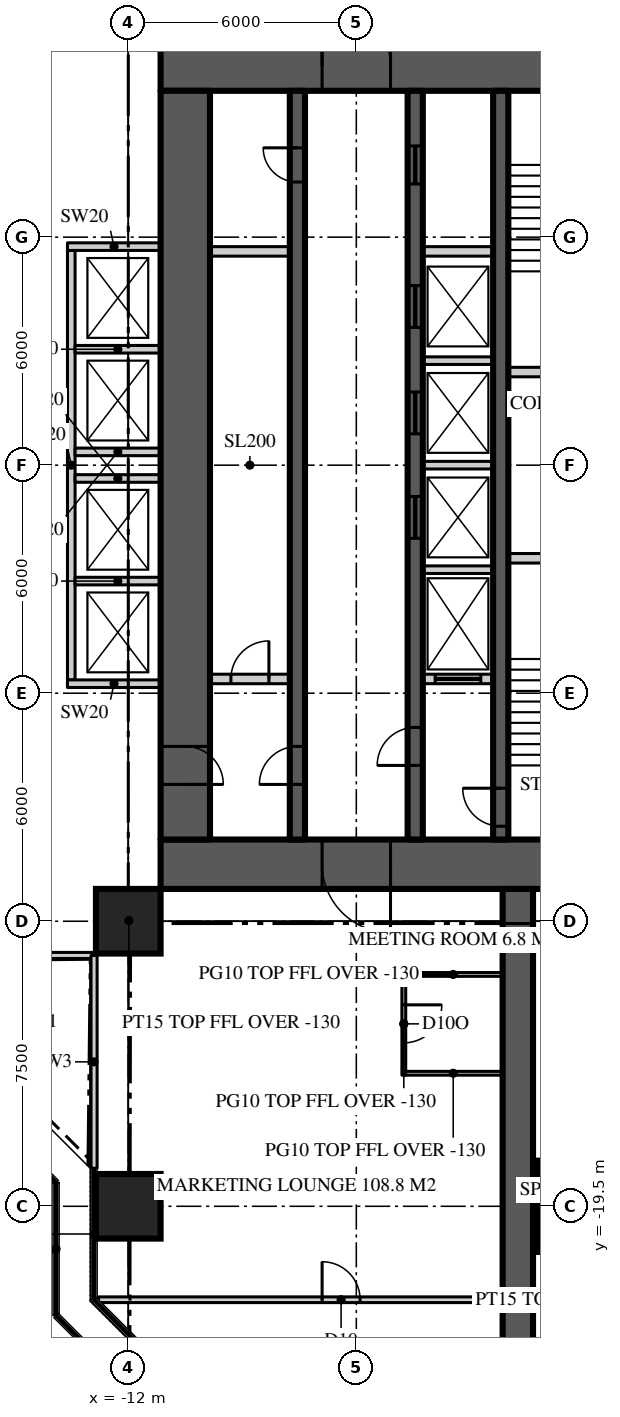
"""IFC4 building model, lengths in metres.
Left out: names, types, materials, properties, quantities, classifications, styles, units other than length and angle.
Written with IfcOpenShell. Run it as: python <this file> out.ifc"""

import sys

from ifc_helpers import new_model, si_unit, direction, frame, frame_2d, origin, origin_2d, place, context, subcontext, project, spatial, rectangle, extrude, element, fill, save


model = new_model("IFC4")
c1 = context("Model", 3, precision=1e-05, world=origin(), true_north=direction((0.0, 1.0)))
c2 = subcontext(c1, "Body", "Model", "MODEL_VIEW")
j1 = project(units=[si_unit("LENGTHUNIT", "METRE"), si_unit("PLANEANGLEUNIT", "RADIAN")], contexts=[c1])
p1 = place(None, origin())
s1 = spatial("IfcSite", under=j1, at=p1, CompositionType="ELEMENT")
p2 = place(p1, origin())
s2 = spatial("IfcBuilding", under=s1, at=p2, CompositionType="ELEMENT")
p3 = place(p2, frame((0.0, 0.0, 190.5)))
s3 = spatial("IfcBuildingStorey", under=s2, at=p3, CompositionType="ELEMENT", Elevation=190.5)
p4 = place(p3, frame((-11.15, 10.5, 0.0), z_axis=(0.0, 0.0, 1.0), x_axis=(1.0, 0.0, 0.0)))
e1 = element("IfcWall", 1, at=p4, inside=s3, PredefinedType="SHEAR", context=c2, shape_type="SweptSolid", body=[
    extrude(rectangle(XDim=22.3, YDim=1.3, at=frame_2d((11.15, 0.0))), origin(), (0.0, 0.0, 1.0), 3.9),
])
p5 = place(p4, frame((4.25, 0.0, 0.0)))
e2 = element("IfcOpeningElement", 2, at=p5, cuts=e1, PredefinedType="OPENING", context=c2, shape_type="SweptSolid", body=[
    extrude(rectangle(XDim=1.8, YDim=2.2, at=frame_2d((0.9, 1.1))), frame((0.0, 0.66, 0.0), z_axis=(0.0, -1.0, 0.0), x_axis=(1.0, 0.0, 0.0)), (0.0, 0.0, 1.0), 1.32),
])
p6 = place(p4, frame((16.25, 0.0, 0.0)))
e3 = element("IfcOpeningElement", 3, at=p6, cuts=e1, PredefinedType="OPENING", context=c2, shape_type="SweptSolid", body=[
    extrude(rectangle(XDim=1.8, YDim=2.2, at=frame_2d((0.9, 1.1))), frame((0.0, 0.66, 0.0), z_axis=(0.0, -1.0, 0.0), x_axis=(1.0, 0.0, 0.0)), (0.0, 0.0, 1.0), 1.32),
])
p7 = place(p3, frame((11.15, -10.5, 0.0), z_axis=(0.0, 0.0, 1.0), x_axis=(-1.0, 0.0, 0.0)))
e4 = element("IfcWall", 4, at=p7, inside=s3, PredefinedType="SHEAR", context=c2, shape_type="SweptSolid", body=[
    extrude(rectangle(XDim=22.3, YDim=1.3, at=frame_2d((11.15, 0.0))), origin(), (0.0, 0.0, 1.0), 3.9),
])
p8 = place(p7, frame((16.25, 0.0, 0.0)))
e5 = element("IfcOpeningElement", 5, at=p8, cuts=e4, PredefinedType="OPENING", context=c2, shape_type="SweptSolid", body=[
    extrude(rectangle(XDim=1.8, YDim=2.2, at=frame_2d((0.9, 1.1))), frame((0.0, 0.66, 0.0), z_axis=(0.0, -1.0, 0.0), x_axis=(1.0, 0.0, 0.0)), (0.0, 0.0, 1.0), 1.32),
])
p9 = place(p7, frame((4.25, 0.0, 0.0)))
e6 = element("IfcOpeningElement", 6, at=p9, cuts=e4, PredefinedType="OPENING", context=c2, shape_type="SweptSolid", body=[
    extrude(rectangle(XDim=1.8, YDim=2.2, at=frame_2d((0.9, 1.1))), frame((0.0, 0.66, 0.0), z_axis=(0.0, -1.0, 0.0), x_axis=(1.0, 0.0, 0.0)), (0.0, 0.0, 1.0), 1.32),
])
p10 = place(p3, frame((-10.5, 9.85, 0.0), z_axis=(0.0, 0.0, 1.0), x_axis=(0.0, -1.0, 0.0)))
e7 = element("IfcWall", 7, at=p10, inside=s3, PredefinedType="SHEAR", context=c2, shape_type="SweptSolid", body=[
    extrude(rectangle(XDim=19.7, YDim=1.3, at=frame_2d((9.85, 0.0))), origin(), (0.0, 0.0, 1.0), 3.9),
])
p11 = place(p10, frame((17.25, 0.0, 0.0)))
e8 = element("IfcOpeningElement", 8, at=p11, cuts=e7, PredefinedType="OPENING", context=c2, shape_type="SweptSolid", body=[
    extrude(rectangle(XDim=1.0, YDim=2.2, at=frame_2d((0.5, 1.1))), frame((0.0, 0.66, 0.0), z_axis=(0.0, -1.0, 0.0), x_axis=(1.0, 0.0, 0.0)), (0.0, 0.0, 1.0), 1.32),
])
p12 = place(p3, frame((-1.75, -11.15, 0.0), z_axis=(0.0, 0.0, 1.0), x_axis=(0.0, -1.0, 0.0)))
e9 = element("IfcWall", 9, at=p12, inside=s3, PredefinedType="SHEAR", context=c2, shape_type="SweptSolid", body=[
    extrude(rectangle(XDim=15.25, YDim=0.8, at=frame_2d((7.625, 0.0))), origin(), (0.0, 0.0, 1.0), 3.9),
])
p13 = place(p3, frame((-12.0, -19.5, 0.0), z_axis=(0.0, 0.0, 1.0), x_axis=(1.0, 0.0, 0.0)))
e10 = element("IfcColumn", 10, at=p13, inside=s3, PredefinedType="COLUMN", context=c2, shape_type="SweptSolid", body=[
    extrude(rectangle(XDim=1.7, YDim=1.7, at=origin_2d()), origin(), (0.0, 0.0, 1.0), 3.9),
])
p14 = place(p3, frame((0.0, -19.5, 0.0), z_axis=(0.0, 0.0, 1.0), x_axis=(1.0, 0.0, 0.0)))
e11 = element("IfcColumn", 11, at=p14, inside=s3, PredefinedType="COLUMN", context=c2, shape_type="SweptSolid", body=[
    extrude(rectangle(XDim=2.4, YDim=2.4, at=origin_2d()), origin(), (0.0, 0.0, 1.0), 3.9),
])
p15 = place(p3, frame((-12.0, -12.0, 0.0), z_axis=(0.0, 0.0, 1.0), x_axis=(1.0, 0.0, 0.0)))
e12 = element("IfcColumn", 12, at=p15, inside=s3, PredefinedType="COLUMN", context=c2, shape_type="SweptSolid", body=[
    extrude(rectangle(XDim=1.7, YDim=1.7, at=origin_2d()), origin(), (0.0, 0.0, 1.0), 3.9),
])
p16 = place(p3, frame((-18.5, -12.9, 0.0), z_axis=(0.0, 0.0, 1.0), x_axis=(1.0, 0.0, 0.0)))
e13 = element("IfcWall", 13, at=p16, inside=s3, PredefinedType="SOLIDWALL", context=c2, shape_type="SweptSolid", body=[
    extrude(rectangle(XDim=5.6, YDim=0.16, at=frame_2d((2.8, 0.0))), origin(), (0.0, 0.0, 1.0), 3.77),
])
p17 = place(p16, frame((2.3, 0.0, 0.0)))
e14 = element("IfcOpeningElement", 14, at=p17, cuts=e13, PredefinedType="OPENING", context=c2, shape_type="SweptSolid", body=[
    extrude(rectangle(XDim=1.0, YDim=2.2, at=frame_2d((0.5, 1.1))), frame((0.0, 0.09, 0.0), z_axis=(0.0, -1.0, 0.0), x_axis=(1.0, 0.0, 0.0)), (0.0, 0.0, 1.0), 0.18),
])
p18 = place(p3, frame((-12.9, -12.9, 0.0), z_axis=(0.0, 0.0, 1.0), x_axis=(0.0, -1.0, 0.0)))
e15 = element("IfcWall", 15, at=p18, inside=s3, PredefinedType="SOLIDWALL", context=c2, shape_type="SweptSolid", body=[
    extrude(rectangle(XDim=5.6, YDim=0.16, at=frame_2d((2.8, 0.0))), origin(), (0.0, 0.0, 1.0), 3.77),
])
p19 = place(p3, frame((-7.55, -9.85, 0.0), z_axis=(0.0, 0.0, 1.0), x_axis=(0.0, 1.0, 0.0)))
e16 = element("IfcWall", 16, at=p19, inside=s3, PredefinedType="SHEAR", context=c2, shape_type="SweptSolid", body=[
    extrude(rectangle(XDim=19.7, YDim=0.4, at=frame_2d((9.85, 0.0))), origin(), (0.0, 0.0, 1.0), 3.9),
])
p20 = place(p19, frame((1.45, 0.0, 0.0)))
e17 = element("IfcOpeningElement", 17, at=p20, cuts=e16, PredefinedType="OPENING", context=c2, shape_type="SweptSolid", body=[
    extrude(rectangle(XDim=1.0, YDim=2.2, at=frame_2d((0.5, 1.1))), frame((0.0, 0.21, 0.0), z_axis=(0.0, -1.0, 0.0), x_axis=(1.0, 0.0, 0.0)), (0.0, 0.0, 1.0), 0.42),
])
p21 = place(p19, frame((17.3, 0.0, 0.0)))
e18 = element("IfcOpeningElement", 18, at=p21, cuts=e16, PredefinedType="OPENING", context=c2, shape_type="SweptSolid", body=[
    extrude(rectangle(XDim=0.9, YDim=2.1, at=frame_2d((0.45, 1.05))), frame((0.0, 0.21, 0.0), z_axis=(0.0, -1.0, 0.0), x_axis=(1.0, 0.0, 0.0)), (0.0, 0.0, 1.0), 0.42),
])
p22 = place(p3, frame((-4.45, -9.85, 0.0), z_axis=(0.0, 0.0, 1.0), x_axis=(0.0, 1.0, 0.0)))
e19 = element("IfcWall", 19, at=p22, inside=s3, PredefinedType="SHEAR", context=c2, shape_type="SweptSolid", body=[
    extrude(rectangle(XDim=19.7, YDim=0.4, at=frame_2d((9.85, 0.0))), origin(), (0.0, 0.0, 1.0), 3.9),
])
p23 = place(p22, frame((1.95, 0.0, 0.0)))
e20 = element("IfcOpeningElement", 20, at=p23, cuts=e19, PredefinedType="OPENING", context=c2, shape_type="SweptSolid", body=[
    extrude(rectangle(XDim=1.0, YDim=2.2, at=frame_2d((0.5, 1.1))), frame((0.0, 0.21, 0.0), z_axis=(0.0, -1.0, 0.0), x_axis=(1.0, 0.0, 0.0)), (0.0, 0.0, 1.0), 0.42),
])
p24 = place(p22, frame((17.25, 0.0, 0.0)))
e21 = element("IfcOpeningElement", 21, at=p24, cuts=e19, PredefinedType="OPENING", context=c2, shape_type="SweptSolid", body=[
    extrude(rectangle(XDim=1.0, YDim=2.1, at=frame_2d((0.5, 1.05))), frame((0.0, 0.21, 0.0), z_axis=(0.0, -1.0, 0.0), x_axis=(1.0, 0.0, 0.0)), (0.0, 0.0, 1.0), 0.42),
])
p25 = place(p22, frame((7.925, 0.0, 0.0)))
e22 = element("IfcOpeningElement", 22, at=p25, cuts=e19, PredefinedType="OPENING", context=c2, shape_type="SweptSolid", body=[
    extrude(rectangle(XDim=1.1, YDim=2.2, at=frame_2d((0.55, 1.1))), frame((0.0, 0.21, 0.0), z_axis=(0.0, -1.0, 0.0), x_axis=(1.0, 0.0, 0.0)), (0.0, 0.0, 1.0), 0.42),
])
p26 = place(p22, frame((10.675, 0.0, 0.0)))
e23 = element("IfcOpeningElement", 23, at=p26, cuts=e19, PredefinedType="OPENING", context=c2, shape_type="SweptSolid", body=[
    extrude(rectangle(XDim=1.1, YDim=2.2, at=frame_2d((0.55, 1.1))), frame((0.0, 0.21, 0.0), z_axis=(0.0, -1.0, 0.0), x_axis=(1.0, 0.0, 0.0)), (0.0, 0.0, 1.0), 0.42),
])
p27 = place(p22, frame((13.475, 0.0, 0.0)))
e24 = element("IfcOpeningElement", 24, at=p27, cuts=e19, PredefinedType="OPENING", context=c2, shape_type="SweptSolid", body=[
    extrude(rectangle(XDim=1.1, YDim=2.2, at=frame_2d((0.55, 1.1))), frame((0.0, 0.21, 0.0), z_axis=(0.0, -1.0, 0.0), x_axis=(1.0, 0.0, 0.0)), (0.0, 0.0, 1.0), 0.42),
])
p28 = place(p3, frame((-2.2, -9.85, 0.0), z_axis=(0.0, 0.0, 1.0), x_axis=(0.0, 1.0, 0.0)))
e25 = element("IfcWall", 25, at=p28, inside=s3, PredefinedType="SHEAR", context=c2, shape_type="SweptSolid", body=[
    extrude(rectangle(XDim=19.7, YDim=0.4, at=frame_2d((9.85, 0.0))), origin(), (0.0, 0.0, 1.0), 3.9),
])
p29 = place(p28, frame((0.35, 0.0, 0.0)))
e26 = element("IfcOpeningElement", 26, at=p29, cuts=e25, PredefinedType="OPENING", context=c2, shape_type="SweptSolid", body=[
    extrude(rectangle(XDim=1.0, YDim=2.2, at=frame_2d((0.5, 1.1))), frame((0.0, 0.21, 0.0), z_axis=(0.0, -1.0, 0.0), x_axis=(1.0, 0.0, 0.0)), (0.0, 0.0, 1.0), 0.42),
])
p30 = place(p3, frame((-9.85, 5.625, 0.0), z_axis=(0.0, 0.0, 1.0), x_axis=(1.0, 0.0, 0.0)))
e27 = element("IfcWall", 27, at=p30, inside=s3, PredefinedType="SOLIDWALL", context=c2, shape_type="SweptSolid", body=[
    extrude(rectangle(XDim=2.1, YDim=0.25, at=frame_2d((1.05, 0.0))), origin(), (0.0, 0.0, 1.0), 3.7),
])
p31 = place(p3, frame((-4.25, 5.625, 0.0), z_axis=(0.0, 0.0, 1.0), x_axis=(1.0, 0.0, 0.0)))
e28 = element("IfcWall", 28, at=p31, inside=s3, PredefinedType="SOLIDWALL", context=c2, shape_type="SweptSolid", body=[
    extrude(rectangle(XDim=1.85, YDim=0.25, at=frame_2d((0.925, 0.0))), origin(), (0.0, 0.0, 1.0), 3.7),
])
p32 = place(p3, frame((-9.85, -5.625, 0.0), z_axis=(0.0, 0.0, 1.0), x_axis=(1.0, 0.0, 0.0)))
e29 = element("IfcWall", 29, at=p32, inside=s3, PredefinedType="SOLIDWALL", context=c2, shape_type="SweptSolid", body=[
    extrude(rectangle(XDim=2.1, YDim=0.25, at=frame_2d((1.05, 0.0))), origin(), (0.0, 0.0, 1.0), 3.7),
])
p33 = place(p32, frame((0.55, 0.0, 0.0)))
e30 = element("IfcOpeningElement", 30, at=p33, cuts=e29, PredefinedType="OPENING", context=c2, shape_type="SweptSolid", body=[
    extrude(rectangle(XDim=1.0, YDim=2.2, at=frame_2d((0.5, 1.1))), frame((0.0, 0.135, 0.0), z_axis=(0.0, -1.0, 0.0), x_axis=(1.0, 0.0, 0.0)), (0.0, 0.0, 1.0), 0.27),
])
p34 = place(p3, frame((-4.25, -5.625, 0.0), z_axis=(0.0, 0.0, 1.0), x_axis=(1.0, 0.0, 0.0)))
e31 = element("IfcWall", 31, at=p34, inside=s3, PredefinedType="SOLIDWALL", context=c2, shape_type="SweptSolid", body=[
    extrude(rectangle(XDim=1.85, YDim=0.25, at=frame_2d((0.925, 0.0))), origin(), (0.0, 0.0, 1.0), 3.7),
])
p35 = place(p34, frame((0.325, 0.0, 0.0)))
e32 = element("IfcOpeningElement", 32, at=p35, cuts=e31, PredefinedType="OPENING", context=c2, shape_type="SweptSolid", body=[
    extrude(rectangle(XDim=1.2, YDim=2.2, at=frame_2d((0.6, 1.1))), frame((0.0, 0.135, 0.0), z_axis=(0.0, -1.0, 0.0), x_axis=(1.0, 0.0, 0.0)), (0.0, 0.0, 1.0), 0.27),
])
for number, where, z_axis, x_axis in (
    (33, (-2.0, -2.45, 0.0), (0.0, 0.0, 1.0), (1.0, 0.0, 0.0)),
    (34, (-2.0, 2.45, 0.0), (0.0, 0.0, 1.0), (1.0, 0.0, 0.0)),
):
    element("IfcWall", number, at=place(p3, frame(where, z_axis=z_axis, x_axis=x_axis)), inside=s3, PredefinedType="SOLIDWALL", context=c2, shape_type="SweptSolid", body=[
        extrude(rectangle(XDim=4.0, YDim=0.25, at=frame_2d((2.0, 0.0))), origin(), (0.0, 0.0, 1.0), 3.7),
    ])
for number, where, z_axis, x_axis in (
    (35, (-4.25, -2.75, 0.0), (0.0, 0.0, 1.0), (1.0, 0.0, 0.0)),
    (36, (-4.25, 0.0, 0.0), (0.0, 0.0, 1.0), (1.0, 0.0, 0.0)),
    (37, (-4.25, 2.75, 0.0), (0.0, 0.0, 1.0), (1.0, 0.0, 0.0)),
):
    element("IfcWall", number, at=place(p3, frame(where, z_axis=z_axis, x_axis=x_axis)), inside=s3, PredefinedType="SOLIDWALL", context=c2, shape_type="SweptSolid", body=[
        extrude(rectangle(XDim=1.85, YDim=0.2, at=frame_2d((0.925, 0.0))), origin(), (0.0, 0.0, 1.0), 3.7),
    ])
p36 = place(p3, frame((-12.786, -21.959, 0.0), z_axis=(0.0, 0.0, 1.0), x_axis=(1.0, 0.0, 0.0)))
e38 = element("IfcWall", 38, at=p36, inside=s3, PredefinedType="PARTITIONING", context=c2, shape_type="SweptSolid", body=[
    extrude(rectangle(XDim=25.573, YDim=0.15, at=frame_2d((12.786, 0.0))), origin(), (0.0, 0.0, 1.0), 3.77),
])
p37 = place(p36, frame((18.687, 0.0, 0.0)))
e39 = element("IfcOpeningElement", 39, at=p37, cuts=e38, PredefinedType="OPENING", context=c2, shape_type="SweptSolid", body=[
    extrude(rectangle(XDim=1.0, YDim=2.2, at=frame_2d((0.5, 1.1))), frame((0.0, 0.085, 0.0), z_axis=(0.0, -1.0, 0.0), x_axis=(1.0, 0.0, 0.0)), (0.0, 0.0, 1.0), 0.17),
])
p38 = place(p36, frame((5.886, 0.0, 0.0)))
e40 = element("IfcOpeningElement", 40, at=p38, cuts=e38, PredefinedType="OPENING", context=c2, shape_type="SweptSolid", body=[
    extrude(rectangle(XDim=1.0, YDim=2.2, at=frame_2d((0.5, 1.1))), frame((0.0, 0.085, 0.0), z_axis=(0.0, -1.0, 0.0), x_axis=(1.0, 0.0, 0.0)), (0.0, 0.0, 1.0), 0.17),
])
for number, where, z_axis, x_axis in (
    (41, (-2.15, -13.4, 0.0), (0.0, 0.0, 1.0), (-1.0, 0.0, 0.0)),
    (42, (-2.15, -16.0, 0.0), (0.0, 0.0, 1.0), (-1.0, 0.0, 0.0)),
):
    element("IfcWall", number, at=place(p3, frame(where, z_axis=z_axis, x_axis=x_axis)), inside=s3, PredefinedType="PARTITIONING", context=c2, shape_type="SweptSolid", body=[
        extrude(rectangle(XDim=2.6, YDim=0.1, at=frame_2d((1.3, 0.0))), origin(), (0.0, 0.0, 1.0), 3.77),
    ])
p39 = place(p3, frame((-4.75, -13.35, 0.0), z_axis=(0.0, 0.0, 1.0), x_axis=(0.0, -1.0, 0.0)))
e43 = element("IfcWall", 43, at=p39, inside=s3, PredefinedType="PARTITIONING", context=c2, shape_type="SweptSolid", body=[
    extrude(rectangle(XDim=2.7, YDim=0.1, at=frame_2d((1.35, 0.0))), origin(), (0.0, 0.0, 1.0), 3.77),
])
p40 = place(p39, frame((0.85, 0.0, 0.0)))
e44 = element("IfcOpeningElement", 44, at=p40, cuts=e43, PredefinedType="OPENING", context=c2, shape_type="SweptSolid", body=[
    extrude(rectangle(XDim=1.0, YDim=2.2, at=frame_2d((0.5, 1.1))), frame((0.0, 0.06, 0.0), z_axis=(0.0, -1.0, 0.0), x_axis=(1.0, 0.0, 0.0)), (0.0, 0.0, 1.0), 0.12),
])
p41 = place(p3, frame((-13.5, 5.65, 0.0), z_axis=(0.0, 0.0, 1.0), x_axis=(0.0, -1.0, 0.0)))
e45 = element("IfcWall", 45, at=p41, inside=s3, PredefinedType="SOLIDWALL", context=c2, shape_type="SweptSolid", body=[
    extrude(rectangle(XDim=11.3, YDim=0.2, at=frame_2d((5.65, 0.0))), origin(), (0.0, 0.0, 1.0), 3.7),
])
for number, where, z_axis, x_axis in (
    (46, (-11.15, 5.75, 0.0), (0.0, 0.0, 1.0), (-1.0, 0.0, 0.0)),
    (47, (-11.15, -5.75, 0.0), (0.0, 0.0, 1.0), (-1.0, 0.0, 0.0)),
):
    element("IfcWall", number, at=place(p3, frame(where, z_axis=z_axis, x_axis=x_axis)), inside=s3, PredefinedType="SOLIDWALL", context=c2, shape_type="SweptSolid", body=[
        extrude(rectangle(XDim=2.45, YDim=0.2, at=frame_2d((1.225, 0.0))), origin(), (0.0, 0.0, 1.0), 3.7),
    ])
for number, where, z_axis, x_axis in (
    (48, (-11.15, 3.05, 0.0), (0.0, 0.0, 1.0), (-1.0, 0.0, 0.0)),
    (49, (-11.15, 0.35, 0.0), (0.0, 0.0, 1.0), (-1.0, 0.0, 0.0)),
    (50, (-11.15, -0.35, 0.0), (0.0, 0.0, 1.0), (-1.0, 0.0, 0.0)),
    (51, (-11.15, -3.05, 0.0), (0.0, 0.0, 1.0), (-1.0, 0.0, 0.0)),
):
    element("IfcWall", number, at=place(p3, frame(where, z_axis=z_axis, x_axis=x_axis)), inside=s3, PredefinedType="SOLIDWALL", context=c2, shape_type="SweptSolid", body=[
        extrude(rectangle(XDim=2.25, YDim=0.2, at=frame_2d((1.125, 0.0))), origin(), (0.0, 0.0, 1.0), 3.7),
    ])
p42 = place(p3, frame((-11.15, -11.15, 0.0), z_axis=(0.0, 0.0, 1.0), x_axis=(-0.707106781187, -0.707106781187, 0.0)))
e52 = element("IfcWall", 52, at=p42, inside=s3, PredefinedType="PARTITIONING", context=c2, shape_type="SweptSolid", body=[
    extrude(rectangle(XDim=2.362, YDim=0.15, at=frame_2d((1.181, 0.0))), origin(), (0.0, 0.0, 1.0), 3.77),
])
p43 = place(p5, origin())
e53 = element("IfcDoor", 53, at=p43, inside=s3, OperationType="DOUBLE_DOOR_DOUBLE_SWING", PredefinedType="DOOR", context=c2, shape_type="SweptSolid", body=[
    extrude(rectangle(XDim=1.8, YDim=2.2, at=frame_2d((0.9, 1.1))), frame((0.0, 0.025, 0.0), z_axis=(0.0, -1.0, 0.0), x_axis=(1.0, 0.0, 0.0)), (0.0, 0.0, 1.0), 0.05),
])
fill(e2, e53)
p44 = place(p8, origin())
e54 = element("IfcDoor", 54, at=p44, inside=s3, OperationType="DOUBLE_DOOR_DOUBLE_SWING", PredefinedType="DOOR", context=c2, shape_type="SweptSolid", body=[
    extrude(rectangle(XDim=1.8, YDim=2.2, at=frame_2d((0.9, 1.1))), frame((0.0, 0.025, 0.0), z_axis=(0.0, -1.0, 0.0), x_axis=(1.0, 0.0, 0.0)), (0.0, 0.0, 1.0), 0.05),
])
fill(e5, e54)
p45 = place(p20, origin())
e55 = element("IfcDoor", 55, at=p45, inside=s3, OperationType="SINGLE_SWING_LEFT", PredefinedType="DOOR", context=c2, shape_type="SweptSolid", body=[
    extrude(rectangle(XDim=1.0, YDim=2.2, at=frame_2d((0.5, 1.1))), frame((0.0, 0.025, 0.0), z_axis=(0.0, -1.0, 0.0), x_axis=(1.0, 0.0, 0.0)), (0.0, 0.0, 1.0), 0.05),
])
fill(e17, e55)
p46 = place(p11, origin())
e56 = element("IfcDoor", 56, at=p46, inside=s3, OperationType="SINGLE_SWING_RIGHT", PredefinedType="DOOR", context=c2, shape_type="SweptSolid", body=[
    extrude(rectangle(XDim=1.0, YDim=2.2, at=frame_2d((0.5, 1.1))), frame((0.0, 0.025, 0.0), z_axis=(0.0, -1.0, 0.0), x_axis=(1.0, 0.0, 0.0)), (0.0, 0.0, 1.0), 0.05),
])
fill(e8, e56)
p47 = place(p23, origin())
e57 = element("IfcDoor", 57, at=p47, inside=s3, OperationType="SINGLE_SWING_LEFT", PredefinedType="DOOR", context=c2, shape_type="SweptSolid", body=[
    extrude(rectangle(XDim=1.0, YDim=2.2, at=frame_2d((0.5, 1.1))), frame((0.0, 0.025, 0.0), z_axis=(0.0, -1.0, 0.0), x_axis=(1.0, 0.0, 0.0)), (0.0, 0.0, 1.0), 0.05),
])
fill(e20, e57)
p48 = place(p29, origin())
e58 = element("IfcDoor", 58, at=p48, inside=s3, OperationType="SINGLE_SWING_RIGHT", PredefinedType="DOOR", context=c2, shape_type="SweptSolid", body=[
    extrude(rectangle(XDim=1.0, YDim=2.2, at=frame_2d((0.5, 1.1))), frame((0.0, 0.025, 0.0), z_axis=(0.0, -1.0, 0.0), x_axis=(1.0, 0.0, 0.0)), (0.0, 0.0, 1.0), 0.05),
])
fill(e26, e58)
p49 = place(p21, origin())
e59 = element("IfcDoor", 59, at=p49, inside=s3, OperationType="SINGLE_SWING_RIGHT", PredefinedType="DOOR", context=c2, shape_type="SweptSolid", body=[
    extrude(rectangle(XDim=0.9, YDim=2.1, at=frame_2d((0.45, 1.05))), frame((0.0, 0.025, 0.0), z_axis=(0.0, -1.0, 0.0), x_axis=(1.0, 0.0, 0.0)), (0.0, 0.0, 1.0), 0.05),
])
fill(e18, e59)
p50 = place(p24, origin())
e60 = element("IfcDoor", 60, at=p50, inside=s3, OperationType="SLIDING_TO_LEFT", PredefinedType="DOOR", context=c2, shape_type="SweptSolid", body=[
    extrude(rectangle(XDim=1.0, YDim=2.1, at=frame_2d((0.5, 1.05))), frame((0.0, 0.025, 0.0), z_axis=(0.0, -1.0, 0.0), x_axis=(1.0, 0.0, 0.0)), (0.0, 0.0, 1.0), 0.05),
])
fill(e21, e60)
p51 = place(p25, origin())
e61 = element("IfcDoor", 61, at=p51, inside=s3, OperationType="SLIDING_TO_LEFT", PredefinedType="DOOR", context=c2, shape_type="SweptSolid", body=[
    extrude(rectangle(XDim=1.1, YDim=2.2, at=frame_2d((0.55, 1.1))), frame((0.0, 0.025, 0.0), z_axis=(0.0, -1.0, 0.0), x_axis=(1.0, 0.0, 0.0)), (0.0, 0.0, 1.0), 0.05),
])
fill(e22, e61)
p52 = place(p26, origin())
e62 = element("IfcDoor", 62, at=p52, inside=s3, OperationType="SLIDING_TO_LEFT", PredefinedType="DOOR", context=c2, shape_type="SweptSolid", body=[
    extrude(rectangle(XDim=1.1, YDim=2.2, at=frame_2d((0.55, 1.1))), frame((0.0, 0.025, 0.0), z_axis=(0.0, -1.0, 0.0), x_axis=(1.0, 0.0, 0.0)), (0.0, 0.0, 1.0), 0.05),
])
fill(e23, e62)
p53 = place(p27, origin())
e63 = element("IfcDoor", 63, at=p53, inside=s3, OperationType="SLIDING_TO_LEFT", PredefinedType="DOOR", context=c2, shape_type="SweptSolid", body=[
    extrude(rectangle(XDim=1.1, YDim=2.2, at=frame_2d((0.55, 1.1))), frame((0.0, 0.025, 0.0), z_axis=(0.0, -1.0, 0.0), x_axis=(1.0, 0.0, 0.0)), (0.0, 0.0, 1.0), 0.05),
])
fill(e24, e63)
p54 = place(p35, origin())
e64 = element("IfcDoor", 64, at=p54, inside=s3, OperationType="SLIDING_TO_LEFT", PredefinedType="DOOR", context=c2, shape_type="SweptSolid", body=[
    extrude(rectangle(XDim=1.2, YDim=2.2, at=frame_2d((0.6, 1.1))), frame((0.0, 0.025, 0.0), z_axis=(0.0, -1.0, 0.0), x_axis=(1.0, 0.0, 0.0)), (0.0, 0.0, 1.0), 0.05),
])
fill(e32, e64)
p55 = place(p38, origin())
e65 = element("IfcDoor", 65, at=p55, inside=s3, OperationType="SINGLE_SWING_LEFT", PredefinedType="DOOR", context=c2, shape_type="SweptSolid", body=[
    extrude(rectangle(XDim=1.0, YDim=2.2, at=frame_2d((0.5, 1.1))), frame((0.0, 0.025, 0.0), z_axis=(0.0, -1.0, 0.0), x_axis=(1.0, 0.0, 0.0)), (0.0, 0.0, 1.0), 0.05),
])
fill(e40, e65)
p56 = place(p40, origin())
e66 = element("IfcDoor", 66, at=p56, inside=s3, OperationType="SINGLE_SWING_LEFT", PredefinedType="DOOR", context=c2, shape_type="SweptSolid", body=[
    extrude(rectangle(XDim=1.0, YDim=2.2, at=frame_2d((0.5, 1.1))), frame((0.0, 0.025, 0.0), z_axis=(0.0, -1.0, 0.0), x_axis=(1.0, 0.0, 0.0)), (0.0, 0.0, 1.0), 0.05),
])
fill(e44, e66)
p57 = place(p33, origin())
e67 = element("IfcDoor", 67, at=p57, inside=s3, OperationType="SINGLE_SWING_RIGHT", PredefinedType="DOOR", context=c2, shape_type="SweptSolid", body=[
    extrude(rectangle(XDim=1.0, YDim=2.2, at=frame_2d((0.5, 1.1))), frame((0.0, 0.025, 0.0), z_axis=(0.0, -1.0, 0.0), x_axis=(1.0, 0.0, 0.0)), (0.0, 0.0, 1.0), 0.05),
])
fill(e30, e67)
save(model, sys.argv[1])
